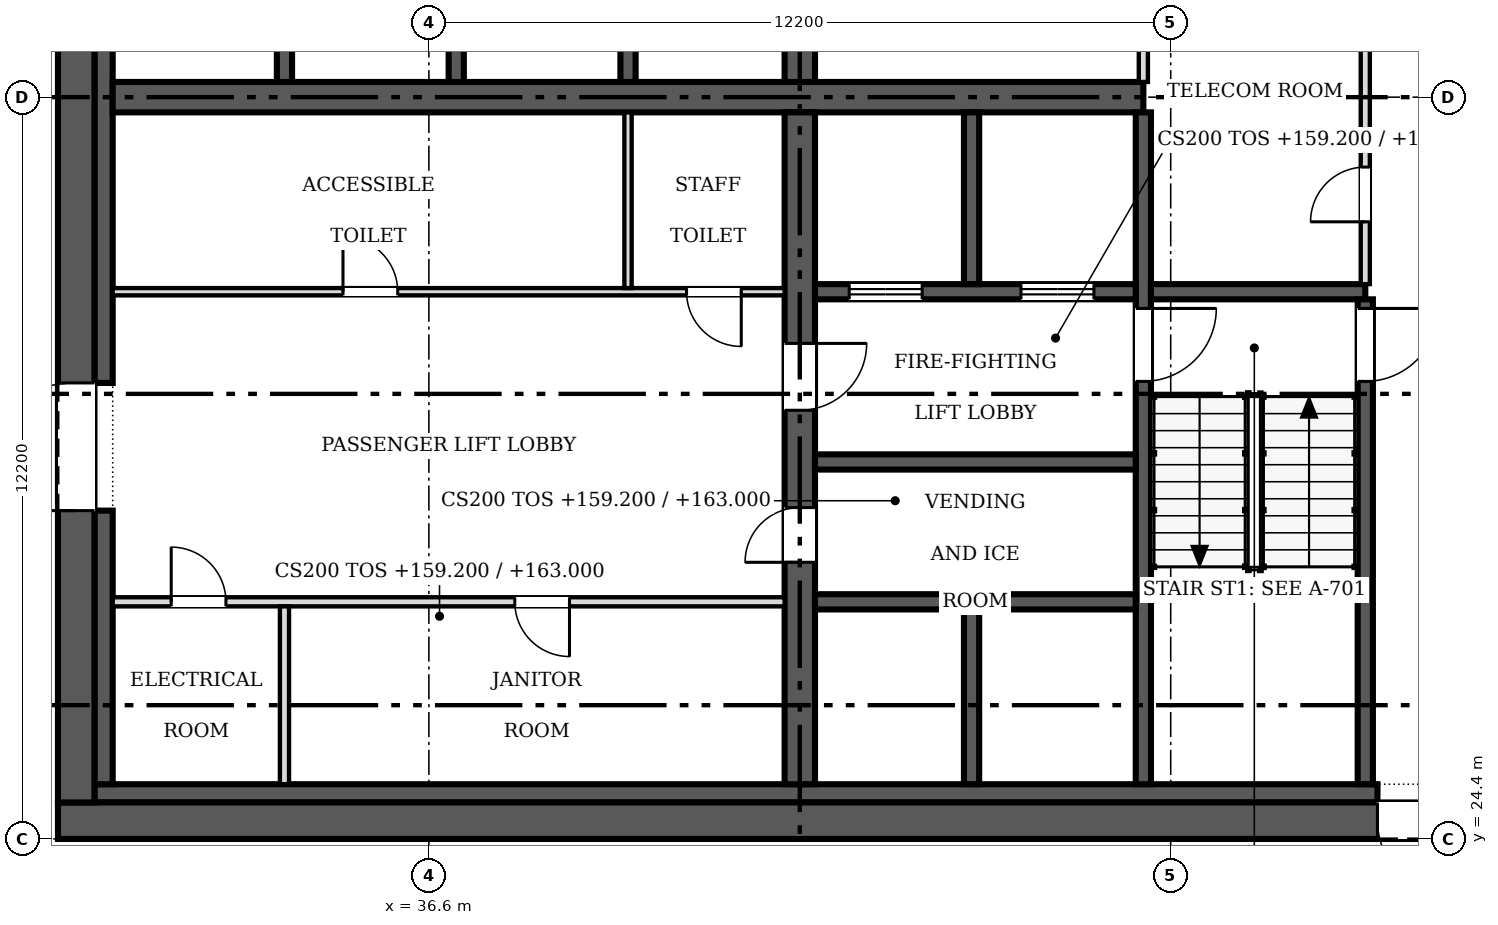
"""IFC4 building model, lengths in metres.
Left out: names, types, materials, properties, quantities, classifications, styles, units other than length and angle.
Written with IfcOpenShell. Run it as: python <this file> out.ifc"""

import sys

from ifc_helpers import new_model, si_unit, direction, frame, frame_2d, origin, place, context, subcontext, project, spatial, rectangle, extrude, source, transform, mapped, element, fill, save


model = new_model("IFC4")
c1 = context("Model", 3, precision=1e-05, world=origin(), true_north=direction((0.0, 1.0)))
c2 = subcontext(c1, "Body", "Model", "MODEL_VIEW")
j1 = project(units=[si_unit("LENGTHUNIT", "METRE"), si_unit("PLANEANGLEUNIT", "RADIAN")], contexts=[c1])
p1 = place(None, origin())
s1 = spatial("IfcSite", under=j1, at=p1, CompositionType="ELEMENT")
p2 = place(p1, origin())
s2 = spatial("IfcBuilding", under=s1, at=p2, CompositionType="ELEMENT")
p3 = place(p2, frame((0.0, 0.0, 159.2)))
s3 = spatial("IfcBuildingStorey", under=s2, at=p3, CompositionType="ELEMENT", Elevation=159.2)
p4 = place(p3, frame((54.9, 24.7, 0.0), z_axis=(0.0, 0.0, 1.0), x_axis=(-1.0, 0.0, 0.0)))
e1 = element("IfcWall", 1, at=p4, inside=s3, PredefinedType="SHEAR", context=c2, shape_type="SweptSolid", body=[
    extrude(rectangle(XDim=24.4, YDim=0.6, at=frame_2d((12.2, 0.0))), origin(), (0.0, 0.0, 1.0), 3.8),
])
m1 = source(origin(), c2, "Body", "SweptSolid", [
    extrude(rectangle(XDim=1.2, YDim=2.1, at=frame_2d((0.6, 1.05))), frame((0.0, 0.31, 0.0), z_axis=(0.0, -1.0, 0.0), x_axis=(1.0, 0.0, 0.0)), (0.0, 0.0, 1.0), 0.62),
])
p5 = place(p4, frame((1.5, 0.0, 0.0)))
e2 = element("IfcOpeningElement", 2, at=p5, cuts=e1, PredefinedType="OPENING", context=c2, shape_type="MappedRepresentation", body=[
    mapped(m1, transform((0.0, 0.0, 0.0), scale=1.0)),
])
p6 = place(p3, frame((30.8, 25.0, 0.0), z_axis=(0.0, 0.0, 1.0), x_axis=(0.0, 1.0, 0.0)))
e3 = element("IfcWall", 3, at=p6, inside=s3, PredefinedType="SHEAR", context=c2, shape_type="SweptSolid", body=[
    extrude(rectangle(XDim=23.2, YDim=0.6, at=frame_2d((11.6, 0.0))), origin(), (0.0, 0.0, 1.0), 3.8),
])
m2 = source(origin(), c2, "Body", "SweptSolid", [
    extrude(rectangle(XDim=2.1, YDim=2.4, at=frame_2d((1.05, 1.2))), frame((0.0, 0.31, 0.0), z_axis=(0.0, -1.0, 0.0), x_axis=(1.0, 0.0, 0.0)), (0.0, 0.0, 1.0), 0.62),
])
p7 = place(p6, frame((4.8, 0.0, 0.0)))
e4 = element("IfcOpeningElement", 4, at=p7, cuts=e3, PredefinedType="OPENING", context=c2, shape_type="MappedRepresentation", body=[
    mapped(m2, transform((0.0, 0.0, 0.0), scale=1.0)),
])
p8 = place(p6, frame((16.3, 0.0, 0.0)))
e5 = element("IfcOpeningElement", 5, at=p8, cuts=e3, PredefinedType="OPENING", context=c2, shape_type="MappedRepresentation", body=[
    mapped(m2, transform((0.0, 0.0, 0.0), scale=1.0)),
])
p9 = place(p3, frame((31.1, 25.15, 0.0), z_axis=(0.0, 0.0, 1.0), x_axis=(1.0, 0.0, 0.0)))
e6 = element("IfcWall", 6, at=p9, inside=s3, PredefinedType="SOLIDWALL", context=c2, shape_type="SweptSolid", body=[
    extrude(rectangle(XDim=21.1, YDim=0.3, at=frame_2d((10.55, 0.0))), origin(), (0.0, 0.0, 1.0), 3.8),
])
p10 = place(p3, frame((31.25, 25.3, 0.0), z_axis=(0.0, 0.0, 1.0), x_axis=(0.0, 1.0, 0.0)))
e7 = element("IfcWall", 7, at=p10, inside=s3, PredefinedType="SOLIDWALL", context=c2, shape_type="SweptSolid", body=[
    extrude(rectangle(XDim=4.5, YDim=0.3, at=frame_2d((2.25, 0.0))), origin(), (0.0, 0.0, 1.0), 3.8),
])
p11 = place(p3, frame((31.25, 31.9, 0.0), z_axis=(0.0, 0.0, 1.0), x_axis=(0.0, 1.0, 0.0)))
e8 = element("IfcWall", 8, at=p11, inside=s3, PredefinedType="SOLIDWALL", context=c2, shape_type="SweptSolid", body=[
    extrude(rectangle(XDim=9.4, YDim=0.3, at=frame_2d((4.7, 0.0))), origin(), (0.0, 0.0, 1.0), 3.8),
])
p12 = place(p3, frame((31.4, 36.6, 0.0), z_axis=(0.0, 0.0, 1.0), x_axis=(1.0, 0.0, 0.0)))
e9 = element("IfcWall", 9, at=p12, inside=s3, PredefinedType="SHEAR", context=c2, shape_type="SweptSolid", body=[
    extrude(rectangle(XDim=16.95, YDim=0.5, at=frame_2d((8.475, 0.0))), origin(), (0.0, 0.0, 1.0), 3.8),
])
p13 = place(p3, frame((42.7, 36.35, 0.0), z_axis=(0.0, 0.0, 1.0), x_axis=(0.0, -1.0, 0.0)))
e10 = element("IfcWall", 10, at=p13, inside=s3, PredefinedType="SHEAR", context=c2, shape_type="SweptSolid", body=[
    extrude(rectangle(XDim=11.05, YDim=0.5, at=frame_2d((5.525, 0.0))), origin(), (0.0, 0.0, 1.0), 3.8),
])
m3 = source(origin(), c2, "Body", "SweptSolid", [
    extrude(rectangle(XDim=0.9, YDim=2.1, at=frame_2d((0.45, 1.05))), frame((0.0, 0.26, 0.0), z_axis=(0.0, -1.0, 0.0), x_axis=(1.0, 0.0, 0.0)), (0.0, 0.0, 1.0), 0.52),
])
p14 = place(p13, frame((6.5, 0.0, 0.0)))
e11 = element("IfcOpeningElement", 11, at=p14, cuts=e10, PredefinedType="OPENING", context=c2, shape_type="MappedRepresentation", body=[
    mapped(m3, transform((0.0, 0.0, 0.0), scale=1.0)),
])
m4 = source(origin(), c2, "Body", "SweptSolid", [
    extrude(rectangle(XDim=1.1, YDim=2.1, at=frame_2d((0.55, 1.05))), frame((0.0, 0.26, 0.0), z_axis=(0.0, -1.0, 0.0), x_axis=(1.0, 0.0, 0.0)), (0.0, 0.0, 1.0), 0.52),
])
p15 = place(p13, frame((3.8, 0.0, 0.0)))
e12 = element("IfcOpeningElement", 12, at=p15, cuts=e10, PredefinedType="OPENING", context=c2, shape_type="MappedRepresentation", body=[
    mapped(m4, transform((0.0, 0.0, 0.0), scale=1.0)),
])
p16 = place(p3, frame((42.7, 36.85, 0.0), z_axis=(0.0, 0.0, 1.0), x_axis=(0.0, 1.0, 0.0)))
e13 = element("IfcWall", 13, at=p16, inside=s3, PredefinedType="SHEAR", context=c2, shape_type="SweptSolid", body=[
    extrude(rectangle(XDim=2.95, YDim=0.5, at=frame_2d((1.475, 0.0))), origin(), (0.0, 0.0, 1.0), 3.8),
])
p17 = place(p3, frame((48.35, 36.35, 0.0), z_axis=(0.0, 0.0, 1.0), x_axis=(0.0, -1.0, 0.0)))
e14 = element("IfcWall", 14, at=p17, inside=s3, PredefinedType="SOLIDWALL", context=c2, shape_type="SweptSolid", body=[
    extrude(rectangle(XDim=11.05, YDim=0.25, at=frame_2d((5.525, 0.0))), origin(), (0.0, 0.0, 1.0), 3.8),
])
m5 = source(origin(), c2, "Body", "SweptSolid", [
    extrude(rectangle(XDim=1.2, YDim=2.1, at=frame_2d((0.6, 1.05))), frame((0.0, 0.135, 0.0), z_axis=(0.0, -1.0, 0.0), x_axis=(1.0, 0.0, 0.0)), (0.0, 0.0, 1.0), 0.27),
])
p18 = place(p17, frame((3.225, 0.0, 0.0)))
e15 = element("IfcOpeningElement", 15, at=p18, cuts=e14, PredefinedType="OPENING", context=c2, shape_type="MappedRepresentation", body=[
    mapped(m5, transform((0.0, 0.0, 0.0), scale=1.0)),
])
p19 = place(p3, frame((48.225, 33.4, 0.0), z_axis=(0.0, 0.0, 1.0), x_axis=(-1.0, 0.0, 0.0)))
e16 = element("IfcWall", 16, at=p19, inside=s3, PredefinedType="SOLIDWALL", context=c2, shape_type="SweptSolid", body=[
    extrude(rectangle(XDim=5.275, YDim=0.25, at=frame_2d((2.638, 0.0))), origin(), (0.0, 0.0, 1.0), 3.8),
])
p20 = place(p19, frame((3.512, 0.0, 0.0)))
e17 = element("IfcOpeningElement", 17, at=p20, cuts=e16, PredefinedType="OPENING", context=c2, shape_type="MappedRepresentation", body=[
    mapped(m5, transform((0.0, 0.0, 0.0), scale=1.0)),
])
p21 = place(p19, frame((0.688, 0.0, 0.0)))
e18 = element("IfcOpeningElement", 18, at=p21, cuts=e16, PredefinedType="OPENING", context=c2, shape_type="MappedRepresentation", body=[
    mapped(m5, transform((0.0, 0.0, 0.0), scale=1.0)),
])
p22 = place(p3, frame((48.475, 33.4, 0.0), z_axis=(0.0, 0.0, 1.0), x_axis=(1.0, 0.0, 0.0)))
e19 = element("IfcWall", 19, at=p22, inside=s3, PredefinedType="SOLIDWALL", context=c2, shape_type="SweptSolid", body=[
    extrude(rectangle(XDim=3.525, YDim=0.25, at=frame_2d((1.762, 0.0))), origin(), (0.0, 0.0, 1.0), 3.8),
])
p23 = place(p3, frame((52.0, 25.3, 0.0), z_axis=(0.0, 0.0, 1.0), x_axis=(0.0, 1.0, 0.0)))
e20 = element("IfcWall", 20, at=p23, inside=s3, PredefinedType="SOLIDWALL", context=c2, shape_type="SweptSolid", body=[
    extrude(rectangle(XDim=7.975, YDim=0.25, at=frame_2d((3.987, 0.0))), origin(), (0.0, 0.0, 1.0), 3.8),
])
p24 = place(p23, frame((6.625, 0.0, 0.0)))
e21 = element("IfcOpeningElement", 21, at=p24, cuts=e20, PredefinedType="OPENING", context=c2, shape_type="MappedRepresentation", body=[
    mapped(m5, transform((0.0, 0.0, 0.0), scale=1.0)),
])
for number, where, z_axis, x_axis in (
    (22, (42.95, 28.3, 0.0), (0.0, 0.0, 1.0), (1.0, 0.0, 0.0)),
    (23, (42.95, 30.6, 0.0), (0.0, 0.0, 1.0), (1.0, 0.0, 0.0)),
):
    element("IfcWall", number, at=place(p3, frame(where, z_axis=z_axis, x_axis=x_axis)), inside=s3, PredefinedType="SOLIDWALL", context=c2, shape_type="SweptSolid", body=[
        extrude(rectangle(XDim=5.275, YDim=0.25, at=frame_2d((2.638, 0.0))), origin(), (0.0, 0.0, 1.0), 3.8),
    ])
for number, where, z_axis, x_axis in (
    (24, (34.225, 36.85, 0.0), (0.0, 0.0, 1.0), (0.0, 1.0, 0.0)),
    (25, (37.05, 36.85, 0.0), (0.0, 0.0, 1.0), (0.0, 1.0, 0.0)),
    (26, (39.875, 36.85, 0.0), (0.0, 0.0, 1.0), (0.0, 1.0, 0.0)),
):
    element("IfcWall", number, at=place(p3, frame(where, z_axis=z_axis, x_axis=x_axis)), inside=s3, PredefinedType="SOLIDWALL", context=c2, shape_type="SweptSolid", body=[
        extrude(rectangle(XDim=2.825, YDim=0.25, at=frame_2d((1.413, 0.0))), origin(), (0.0, 0.0, 1.0), 3.8),
    ])
p25 = place(p3, frame((45.525, 33.525, 0.0), z_axis=(0.0, 0.0, 1.0), x_axis=(0.0, 1.0, 0.0)))
e27 = element("IfcWall", 27, at=p25, inside=s3, PredefinedType="SOLIDWALL", context=c2, shape_type="SweptSolid", body=[
    extrude(rectangle(XDim=2.825, YDim=0.25, at=frame_2d((1.413, 0.0))), origin(), (0.0, 0.0, 1.0), 3.8),
])
p26 = place(p3, frame((45.525, 25.3, 0.0), z_axis=(0.0, 0.0, 1.0), x_axis=(0.0, 1.0, 0.0)))
e28 = element("IfcWall", 28, at=p26, inside=s3, PredefinedType="SOLIDWALL", context=c2, shape_type="SweptSolid", body=[
    extrude(rectangle(XDim=2.875, YDim=0.25, at=frame_2d((1.438, 0.0))), origin(), (0.0, 0.0, 1.0), 3.8),
])
p27 = place(p3, frame((42.45, 28.3, 0.0), z_axis=(0.0, 0.0, 1.0), x_axis=(-1.0, 0.0, 0.0)))
e29 = element("IfcWall", 29, at=p27, inside=s3, PredefinedType="PARTITIONING", context=c2, shape_type="SweptSolid", body=[
    extrude(rectangle(XDim=11.05, YDim=0.15, at=frame_2d((5.525, 0.0))), origin(), (0.0, 0.0, 1.0), 3.6),
])
m6 = source(origin(), c2, "Body", "SweptSolid", [
    extrude(rectangle(XDim=0.9, YDim=2.1, at=frame_2d((0.45, 1.05))), frame((0.0, 0.085, 0.0), z_axis=(0.0, -1.0, 0.0), x_axis=(1.0, 0.0, 0.0)), (0.0, 0.0, 1.0), 0.17),
])
p28 = place(p27, frame((9.188, 0.0, 0.0)))
e30 = element("IfcOpeningElement", 30, at=p28, cuts=e29, PredefinedType="OPENING", context=c2, shape_type="MappedRepresentation", body=[
    mapped(m6, transform((0.0, 0.0, 0.0), scale=1.0)),
])
p29 = place(p27, frame((3.538, 0.0, 0.0)))
e31 = element("IfcOpeningElement", 31, at=p29, cuts=e29, PredefinedType="OPENING", context=c2, shape_type="MappedRepresentation", body=[
    mapped(m6, transform((0.0, 0.0, 0.0), scale=1.0)),
])
p30 = place(p3, frame((31.4, 33.4, 0.0), z_axis=(0.0, 0.0, 1.0), x_axis=(1.0, 0.0, 0.0)))
e32 = element("IfcWall", 32, at=p30, inside=s3, PredefinedType="PARTITIONING", context=c2, shape_type="SweptSolid", body=[
    extrude(rectangle(XDim=11.05, YDim=0.12, at=frame_2d((5.525, 0.0))), origin(), (0.0, 0.0, 1.0), 3.6),
])
m7 = source(origin(), c2, "Body", "SweptSolid", [
    extrude(rectangle(XDim=0.9, YDim=2.1, at=frame_2d((0.45, 1.05))), frame((0.0, 0.07, 0.0), z_axis=(0.0, -1.0, 0.0), x_axis=(1.0, 0.0, 0.0)), (0.0, 0.0, 1.0), 0.14),
])
p31 = place(p30, frame((3.788, 0.0, 0.0)))
e33 = element("IfcOpeningElement", 33, at=p31, cuts=e32, PredefinedType="OPENING", context=c2, shape_type="MappedRepresentation", body=[
    mapped(m7, transform((0.0, 0.0, 0.0), scale=1.0)),
])
p32 = place(p30, frame((9.438, 0.0, 0.0)))
e34 = element("IfcOpeningElement", 34, at=p32, cuts=e32, PredefinedType="OPENING", context=c2, shape_type="MappedRepresentation", body=[
    mapped(m7, transform((0.0, 0.0, 0.0), scale=1.0)),
])
p33 = place(p3, frame((52.0, 33.525, 0.0), z_axis=(0.0, 0.0, 1.0), x_axis=(0.0, 1.0, 0.0)))
e35 = element("IfcWall", 35, at=p33, inside=s3, PredefinedType="PARTITIONING", context=c2, shape_type="SweptSolid", body=[
    extrude(rectangle(XDim=6.275, YDim=0.15, at=frame_2d((3.138, 0.0))), origin(), (0.0, 0.0, 1.0), 3.6),
])
p34 = place(p33, frame((1.025, 0.0, 0.0)))
e36 = element("IfcOpeningElement", 36, at=p34, cuts=e35, PredefinedType="OPENING", context=c2, shape_type="MappedRepresentation", body=[
    mapped(m6, transform((0.0, 0.0, 0.0), scale=1.0)),
])
p35 = place(p3, frame((48.35, 36.85, 0.0), z_axis=(0.0, 0.0, 1.0), x_axis=(0.0, 1.0, 0.0)))
e37 = element("IfcWall", 37, at=p35, inside=s3, PredefinedType="PARTITIONING", context=c2, shape_type="SweptSolid", body=[
    extrude(rectangle(XDim=2.95, YDim=0.15, at=frame_2d((1.475, 0.0))), origin(), (0.0, 0.0, 1.0), 3.6),
])
p36 = place(p3, frame((39.875, 33.46, 0.0), z_axis=(0.0, 0.0, 1.0), x_axis=(0.0, 1.0, 0.0)))
e38 = element("IfcWall", 38, at=p36, inside=s3, PredefinedType="PARTITIONING", context=c2, shape_type="SweptSolid", body=[
    extrude(rectangle(XDim=2.89, YDim=0.12, at=frame_2d((1.445, 0.0))), origin(), (0.0, 0.0, 1.0), 3.6),
])
p37 = place(p3, frame((34.225, 25.3, 0.0), z_axis=(0.0, 0.0, 1.0), x_axis=(0.0, 1.0, 0.0)))
e39 = element("IfcWall", 39, at=p37, inside=s3, PredefinedType="PARTITIONING", context=c2, shape_type="SweptSolid", body=[
    extrude(rectangle(XDim=2.925, YDim=0.15, at=frame_2d((1.462, 0.0))), origin(), (0.0, 0.0, 1.0), 3.6),
])
m8 = source(origin(), c2, "Body", "SweptSolid", [
    extrude(rectangle(XDim=1.2, YDim=2.1, at=frame_2d((0.6, 1.05))), frame((0.0, 0.025, 0.0), z_axis=(0.0, -1.0, 0.0), x_axis=(1.0, 0.0, 0.0)), (0.0, 0.0, 1.0), 0.05),
])
p38 = place(p5, origin())
e40 = element("IfcDoor", 40, at=p38, inside=s3, OperationType="SINGLE_SWING_LEFT", PredefinedType="DOOR", context=c2, shape_type="MappedRepresentation", body=[
    mapped(m8, transform((0.0, 0.0, 0.0), scale=1.0)),
])
fill(e2, e40)
m9 = source(origin(), c2, "Body", "SweptSolid", [
    extrude(rectangle(XDim=2.1, YDim=2.4, at=frame_2d((1.05, 1.2))), frame((0.0, 0.025, 0.0), z_axis=(0.0, -1.0, 0.0), x_axis=(1.0, 0.0, 0.0)), (0.0, 0.0, 1.0), 0.05),
])
p39 = place(p7, origin())
e41 = element("IfcDoor", 41, at=p39, inside=s3, OperationType="DOUBLE_DOOR_SINGLE_SWING", PredefinedType="DOOR", context=c2, shape_type="MappedRepresentation", body=[
    mapped(m9, transform((0.0, 0.0, 0.0), scale=1.0)),
])
fill(e4, e41)
m10 = source(origin(), c2, "Body", "SweptSolid", [
    extrude(rectangle(XDim=0.9, YDim=2.1, at=frame_2d((0.45, 1.05))), frame((0.0, 0.025, 0.0), z_axis=(0.0, -1.0, 0.0), x_axis=(1.0, 0.0, 0.0)), (0.0, 0.0, 1.0), 0.05),
])
p40 = place(p14, origin())
e42 = element("IfcDoor", 42, at=p40, inside=s3, OperationType="SINGLE_SWING_RIGHT", PredefinedType="DOOR", context=c2, shape_type="MappedRepresentation", body=[
    mapped(m10, transform((0.0, 0.0, 0.0), scale=1.0)),
])
fill(e11, e42)
m11 = source(origin(), c2, "Body", "SweptSolid", [
    extrude(rectangle(XDim=1.1, YDim=2.1, at=frame_2d((0.55, 1.05))), frame((0.0, 0.025, 0.0), z_axis=(0.0, -1.0, 0.0), x_axis=(1.0, 0.0, 0.0)), (0.0, 0.0, 1.0), 0.05),
])
p41 = place(p15, origin())
e43 = element("IfcDoor", 43, at=p41, inside=s3, OperationType="SINGLE_SWING_LEFT", PredefinedType="DOOR", context=c2, shape_type="MappedRepresentation", body=[
    mapped(m11, transform((0.0, 0.0, 0.0), scale=1.0)),
])
fill(e12, e43)
p42 = place(p18, origin())
e44 = element("IfcDoor", 44, at=p42, inside=s3, OperationType="SINGLE_SWING_LEFT", PredefinedType="DOOR", context=c2, shape_type="MappedRepresentation", body=[
    mapped(m8, transform((0.0, 0.0, 0.0), scale=1.0)),
])
fill(e15, e44)
p43 = place(p20, origin())
e45 = element("IfcDoor", 45, at=p43, inside=s3, OperationType="DOUBLE_DOOR_SLIDING", PredefinedType="DOOR", context=c2, shape_type="MappedRepresentation", body=[
    mapped(m8, transform((0.0, 0.0, 0.0), scale=1.0)),
])
fill(e17, e45)
p44 = place(p21, origin())
e46 = element("IfcDoor", 46, at=p44, inside=s3, OperationType="DOUBLE_DOOR_SLIDING", PredefinedType="DOOR", context=c2, shape_type="MappedRepresentation", body=[
    mapped(m8, transform((0.0, 0.0, 0.0), scale=1.0)),
])
fill(e18, e46)
p45 = place(p24, origin())
e47 = element("IfcDoor", 47, at=p45, inside=s3, OperationType="SINGLE_SWING_RIGHT", PredefinedType="DOOR", context=c2, shape_type="MappedRepresentation", body=[
    mapped(m8, transform((0.0, 0.0, 0.0), scale=1.0)),
])
fill(e21, e47)
p46 = place(p28, origin())
e48 = element("IfcDoor", 48, at=p46, inside=s3, OperationType="SINGLE_SWING_RIGHT", PredefinedType="DOOR", context=c2, shape_type="MappedRepresentation", body=[
    mapped(m10, transform((0.0, 0.0, 0.0), scale=1.0)),
])
fill(e30, e48)
p47 = place(p29, origin())
e49 = element("IfcDoor", 49, at=p47, inside=s3, OperationType="SINGLE_SWING_LEFT", PredefinedType="DOOR", context=c2, shape_type="MappedRepresentation", body=[
    mapped(m10, transform((0.0, 0.0, 0.0), scale=1.0)),
])
fill(e31, e49)
p48 = place(p31, origin())
e50 = element("IfcDoor", 50, at=p48, inside=s3, OperationType="SINGLE_SWING_LEFT", PredefinedType="DOOR", context=c2, shape_type="MappedRepresentation", body=[
    mapped(m10, transform((0.0, 0.0, 0.0), scale=1.0)),
])
fill(e33, e50)
p49 = place(p32, origin())
e51 = element("IfcDoor", 51, at=p49, inside=s3, OperationType="SINGLE_SWING_RIGHT", PredefinedType="DOOR", context=c2, shape_type="MappedRepresentation", body=[
    mapped(m10, transform((0.0, 0.0, 0.0), scale=1.0)),
])
fill(e34, e51)
p50 = place(p34, origin())
e52 = element("IfcDoor", 52, at=p50, inside=s3, OperationType="SINGLE_SWING_LEFT", PredefinedType="DOOR", context=c2, shape_type="MappedRepresentation", body=[
    mapped(m10, transform((0.0, 0.0, 0.0), scale=1.0)),
])
fill(e36, e52)
save(model, sys.argv[1])
